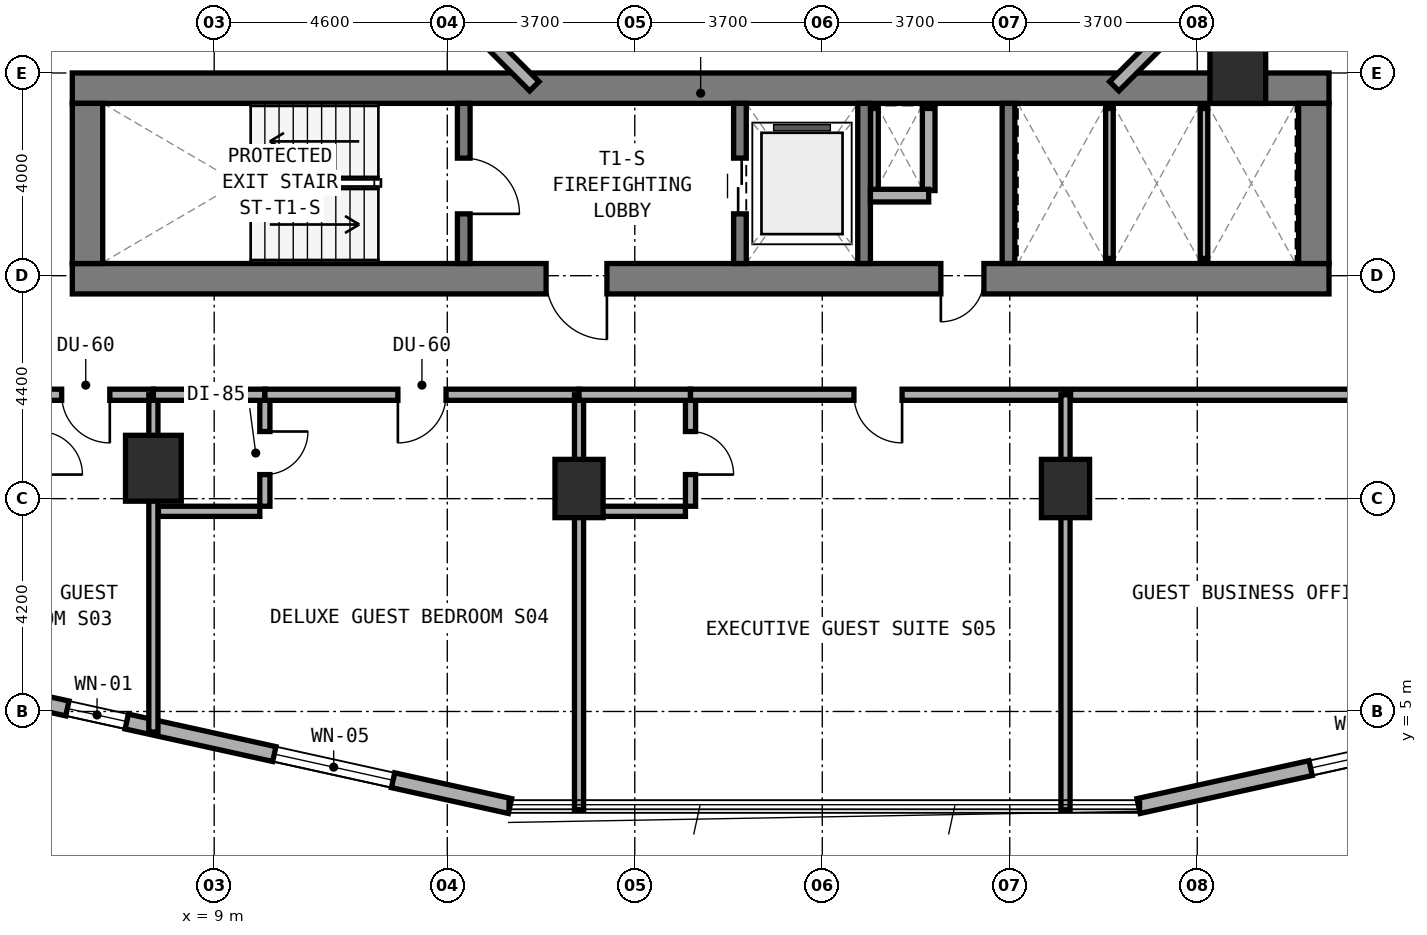
"""IFC4 building model, lengths in metres.
Left out: names, types, materials, properties, quantities, classifications, styles, units other than length and angle.
Written with IfcOpenShell. Run it as: python <this file> out.ifc"""

import sys

from ifc_helpers import new_model, si_unit, direction, frame, frame_2d, origin, origin_2d, place, context, subcontext, project, spatial, rectangle, extrude, element, fill, save


model = new_model("IFC4")
c1 = context("Model", 3, precision=1e-05, world=origin(), true_north=direction((0.0, 1.0)))
c2 = subcontext(c1, "Body", "Model", "MODEL_VIEW")
j1 = project(units=[si_unit("LENGTHUNIT", "METRE"), si_unit("PLANEANGLEUNIT", "RADIAN")], contexts=[c1])
p1 = place(None, origin())
s1 = spatial("IfcSite", under=j1, at=p1, CompositionType="ELEMENT")
p2 = place(p1, origin())
s2 = spatial("IfcBuilding", under=s1, at=p2, CompositionType="ELEMENT")
p3 = place(p2, frame((0.0, 0.0, 24.0)))
s3 = spatial("IfcBuildingStorey", under=s2, at=p3, CompositionType="ELEMENT", Elevation=24.0)
p4 = place(p3, frame((6.2, 13.54, 0.0), z_axis=(0.0, 0.0, 1.0), x_axis=(1.0, 0.0, 0.0)))
e1 = element("IfcWall", 1, at=p4, inside=s3, PredefinedType="SHEAR", context=c2, shape_type="SweptSolid", body=[
    extrude(rectangle(XDim=24.8, YDim=0.6, at=frame_2d((12.4, 0.0))), origin(), (0.0, 0.0, 1.0), 3.5),
])
p5 = place(p4, frame((9.35, 0.0, 0.0)))
e2 = element("IfcOpeningElement", 2, at=p5, cuts=e1, PredefinedType="OPENING", context=c2, shape_type="SweptSolid", body=[
    extrude(rectangle(XDim=1.2, YDim=2.15, at=frame_2d((0.6, 1.075))), frame((0.0, 0.31, 0.0), z_axis=(0.0, -1.0, 0.0), x_axis=(1.0, 0.0, 0.0)), (0.0, 0.0, 1.0), 0.62),
])
p6 = place(p4, frame((17.14, 0.0, 0.0)))
e3 = element("IfcOpeningElement", 3, at=p6, cuts=e1, PredefinedType="OPENING", context=c2, shape_type="SweptSolid", body=[
    extrude(rectangle(XDim=0.85, YDim=2.1, at=frame_2d((0.425, 1.05))), frame((0.0, 0.31, 0.0), z_axis=(0.0, -1.0, 0.0), x_axis=(1.0, 0.0, 0.0)), (0.0, 0.0, 1.0), 0.62),
])
p7 = place(p3, frame((6.2, 17.3, 0.0), z_axis=(0.0, 0.0, 1.0), x_axis=(1.0, 0.0, 0.0)))
e4 = element("IfcWall", 4, at=p7, inside=s3, PredefinedType="SHEAR", context=c2, shape_type="SweptSolid", body=[
    extrude(rectangle(XDim=24.8, YDim=0.6, at=frame_2d((12.4, 0.0))), origin(), (0.0, 0.0, 1.0), 3.5),
])
for number, where, z_axis, x_axis in (
    (5, (6.5, 13.84, 0.0), (0.0, 0.0, 1.0), (0.0, 1.0, 0.0)),
    (6, (30.7, 13.84, 0.0), (0.0, 0.0, 1.0), (0.0, 1.0, 0.0)),
):
    element("IfcWall", number, at=place(p3, frame(where, z_axis=z_axis, x_axis=x_axis)), inside=s3, PredefinedType="SHEAR", context=c2, shape_type="SweptSolid", body=[
        extrude(rectangle(XDim=3.16, YDim=0.6, at=frame_2d((1.58, 0.0))), origin(), (0.0, 0.0, 1.0), 3.5),
    ])
p8 = place(p3, frame((13.925, 13.84, 0.0), z_axis=(0.0, 0.0, 1.0), x_axis=(0.0, 1.0, 0.0)))
e7 = element("IfcWall", 7, at=p8, inside=s3, PredefinedType="STANDARD", context=c2, shape_type="SweptSolid", body=[
    extrude(rectangle(XDim=3.16, YDim=0.25, at=frame_2d((1.58, 0.0))), origin(), (0.0, 0.0, 1.0), 3.22),
])
p9 = place(p8, frame((0.98, 0.0, 0.0)))
e8 = element("IfcOpeningElement", 8, at=p9, cuts=e7, PredefinedType="OPENING", context=c2, shape_type="SweptSolid", body=[
    extrude(rectangle(XDim=1.1, YDim=2.15, at=frame_2d((0.55, 1.075))), frame((0.0, 0.135, 0.0), z_axis=(0.0, -1.0, 0.0), x_axis=(1.0, 0.0, 0.0)), (0.0, 0.0, 1.0), 0.27),
])
p10 = place(p3, frame((19.375, 13.84, 0.0), z_axis=(0.0, 0.0, 1.0), x_axis=(0.0, 1.0, 0.0)))
e9 = element("IfcWall", 9, at=p10, inside=s3, PredefinedType="STANDARD", context=c2, shape_type="SweptSolid", body=[
    extrude(rectangle(XDim=3.16, YDim=0.25, at=frame_2d((1.58, 0.0))), origin(), (0.0, 0.0, 1.0), 3.22),
])
p11 = place(p10, frame((0.98, 0.0, 0.0)))
e10 = element("IfcOpeningElement", 10, at=p11, cuts=e9, PredefinedType="OPENING", context=c2, shape_type="SweptSolid", body=[
    extrude(rectangle(XDim=1.1, YDim=2.15, at=frame_2d((0.55, 1.075))), frame((0.0, 0.135, 0.0), z_axis=(0.0, -1.0, 0.0), x_axis=(1.0, 0.0, 0.0)), (0.0, 0.0, 1.0), 0.27),
])
for number, where, z_axis, x_axis in (
    (11, (21.825, 13.84, 0.0), (0.0, 0.0, 1.0), (0.0, 1.0, 0.0)),
    (12, (24.675, 13.84, 0.0), (0.0, 0.0, 1.0), (0.0, 1.0, 0.0)),
):
    element("IfcWall", number, at=place(p3, frame(where, z_axis=z_axis, x_axis=x_axis)), inside=s3, PredefinedType="STANDARD", context=c2, shape_type="SweptSolid", body=[
        extrude(rectangle(XDim=3.16, YDim=0.25, at=frame_2d((1.58, 0.0))), origin(), (0.0, 0.0, 1.0), 3.22),
    ])
for number, where, z_axis, x_axis in (
    (13, (16.2, 9.4, 0.0), (0.0, 0.0, 1.0), (1.0, 0.0, 0.0)),
    (14, (25.8, 9.4, 0.0), (0.0, 0.0, 1.0), (1.0, 0.0, 0.0)),
):
    element("IfcColumn", number, at=place(p3, frame(where, z_axis=z_axis, x_axis=x_axis)), inside=s3, PredefinedType="COLUMN", context=c2, shape_type="SweptSolid", body=[
        extrude(rectangle(XDim=0.95, YDim=1.15, at=origin_2d()), origin(), (0.0, 0.0, 1.0), 3.5),
    ])
for number, where, z_axis, x_axis in (
    (15, (7.8, 9.8, 0.0), (0.0, 0.0, 1.0), (1.0, 0.0, 0.0)),
    (16, (29.2, 17.65, 0.0), (0.0, 0.0, 1.0), (1.0, 0.0, 0.0)),
):
    element("IfcColumn", number, at=place(p3, frame(where, z_axis=z_axis, x_axis=x_axis)), inside=s3, PredefinedType="COLUMN", context=c2, shape_type="SweptSolid", body=[
        extrude(rectangle(XDim=1.1, YDim=1.3, at=origin_2d()), origin(), (0.0, 0.0, 1.0), 3.5),
    ])
p12 = place(p3, frame((5.704, 5.148, 0.0), z_axis=(0.0, 0.0, 1.0), x_axis=(0.9765437942, -0.215318875183, 0.0)))
e17 = element("IfcWall", 17, at=p12, inside=s3, PredefinedType="STANDARD", context=c2, shape_type="SweptSolid", body=[
    extrude(rectangle(XDim=9.353, YDim=0.3, at=frame_2d((4.677, 0.0))), origin(), (0.0, 0.0, 1.0), 3.22),
])
p13 = place(p12, frame((0.408, 0.0, 0.85)))
e18 = element("IfcOpeningElement", 18, at=p13, cuts=e17, PredefinedType="OPENING", context=c2, shape_type="SweptSolid", body=[
    extrude(rectangle(XDim=1.2, YDim=1.5, at=frame_2d((0.6, 0.75))), frame((0.0, 0.16, 0.0), z_axis=(0.0, -1.0, 0.0), x_axis=(1.0, 0.0, 0.0)), (0.0, 0.0, 1.0), 0.32),
])
p14 = place(p12, frame((4.59, 0.0, 0.8)))
e19 = element("IfcOpeningElement", 19, at=p14, cuts=e17, PredefinedType="OPENING", context=c2, shape_type="SweptSolid", body=[
    extrude(rectangle(XDim=2.4, YDim=1.6, at=frame_2d((1.2, 0.8))), frame((0.0, 0.16, 0.0), z_axis=(0.0, -1.0, 0.0), x_axis=(1.0, 0.0, 0.0)), (0.0, 0.0, 1.0), 0.32),
])
p15 = place(p3, frame((27.242, 3.134, 0.0), z_axis=(0.0, 0.0, 1.0), x_axis=(0.97654500432, 0.215313386808, 0.0)))
e20 = element("IfcWall", 20, at=p15, inside=s3, PredefinedType="STANDARD", context=c2, shape_type="SweptSolid", body=[
    extrude(rectangle(XDim=9.354, YDim=0.3, at=frame_2d((4.677, 0.0))), origin(), (0.0, 0.0, 1.0), 3.22),
])
p16 = place(p15, frame((3.477, 0.0, 0.8)))
e21 = element("IfcOpeningElement", 21, at=p16, cuts=e20, PredefinedType="OPENING", context=c2, shape_type="SweptSolid", body=[
    extrude(rectangle(XDim=2.4, YDim=1.6, at=frame_2d((1.2, 0.8))), frame((0.0, 0.16, 0.0), z_axis=(0.0, -1.0, 0.0), x_axis=(1.0, 0.0, 0.0)), (0.0, 0.0, 1.0), 0.32),
])
p17 = place(p3, frame((26.762, 17.338, 0.0), z_axis=(0.0, 0.0, 1.0), x_axis=(0.707059717605, 0.707153841636, 0.0)))
e22 = element("IfcWall", 22, at=p17, inside=s3, PredefinedType="STANDARD", context=c2, shape_type="SweptSolid", body=[
    extrude(rectangle(XDim=2.594, YDim=0.26, at=frame_2d((1.297, 0.0))), origin(), (0.0, 0.0, 1.0), 3.22),
])
p18 = place(p3, frame((13.484, 19.172, 0.0), z_axis=(0.0, 0.0, 1.0), x_axis=(0.707106781187, -0.707106781187, 0.0)))
e23 = element("IfcWall", 23, at=p18, inside=s3, PredefinedType="STANDARD", context=c2, shape_type="SweptSolid", body=[
    extrude(rectangle(XDim=2.594, YDim=0.26, at=frame_2d((1.297, 0.0))), origin(), (0.0, 0.0, 1.0), 3.22),
])
p19 = place(p3, frame((22.03, 15.28, 0.0), z_axis=(0.0, 0.0, 1.0), x_axis=(0.0, 1.0, 0.0)))
e24 = element("IfcWall", 24, at=p19, inside=s3, PredefinedType="PARTITIONING", context=c2, shape_type="SweptSolid", body=[
    extrude(rectangle(XDim=1.62, YDim=0.15, at=frame_2d((0.81, 0.0))), origin(), (0.0, 0.0, 1.0), 3.22),
])
p20 = place(p3, frame((23.1, 15.28, 0.0), z_axis=(0.0, 0.0, 1.0), x_axis=(0.0, 1.0, 0.0)))
e25 = element("IfcWall", 25, at=p20, inside=s3, PredefinedType="SOLIDWALL", context=c2, shape_type="SweptSolid", body=[
    extrude(rectangle(XDim=1.62, YDim=0.25, at=frame_2d((0.81, 0.0))), origin(), (0.0, 0.0, 1.0), 3.22),
])
p21 = place(p3, frame((21.95, 15.18, 0.0), z_axis=(0.0, 0.0, 1.0), x_axis=(1.0, 0.0, 0.0)))
e26 = element("IfcWall", 26, at=p21, inside=s3, PredefinedType="SOLIDWALL", context=c2, shape_type="SweptSolid", body=[
    extrude(rectangle(XDim=1.15, YDim=0.25, at=frame_2d((0.575, 0.0))), origin(), (0.0, 0.0, 1.0), 3.22),
])
p22 = place(p3, frame((26.667, 13.94, 0.0), z_axis=(0.0, 0.0, 1.0), x_axis=(0.0, 1.0, 0.0)))
e27 = element("IfcWall", 27, at=p22, inside=s3, PredefinedType="PARTITIONING", context=c2, shape_type="SweptSolid", body=[
    extrude(rectangle(XDim=2.96, YDim=0.15, at=frame_2d((1.48, 0.0))), origin(), (0.0, 0.0, 1.0), 3.22),
])
p23 = place(p3, frame((28.533, 13.94, 0.0), z_axis=(0.0, 0.0, 1.0), x_axis=(0.0, 1.0, 0.0)))
e28 = element("IfcWall", 28, at=p23, inside=s3, PredefinedType="PARTITIONING", context=c2, shape_type="SweptSolid", body=[
    extrude(rectangle(XDim=2.96, YDim=0.15, at=frame_2d((1.48, 0.0))), origin(), (0.0, 0.0, 1.0), 2.295),
])
p24 = place(p3, frame((5.55, 11.25, 0.0), z_axis=(0.0, 0.0, 1.0), x_axis=(1.0, 0.0, 0.0)))
e29 = element("IfcWall", 29, at=p24, inside=s3, PredefinedType="SOLIDWALL", context=c2, shape_type="SweptSolid", body=[
    extrude(rectangle(XDim=2.25, YDim=0.22, at=frame_2d((1.125, 0.0))), origin(), (0.0, 0.0, 1.0), 2.295),
])
p25 = place(p24, frame((0.44, 0.0, 0.0)))
e30 = element("IfcOpeningElement", 30, at=p25, cuts=e29, PredefinedType="OPENING", context=c2, shape_type="SweptSolid", body=[
    extrude(rectangle(XDim=0.95, YDim=2.1, at=frame_2d((0.475, 1.05))), frame((0.0, 0.12, 0.0), z_axis=(0.0, -1.0, 0.0), x_axis=(1.0, 0.0, 0.0)), (0.0, 0.0, 1.0), 0.24),
])
p26 = place(p3, frame((7.8, 4.594, 0.0), z_axis=(0.0, 0.0, 1.0), x_axis=(0.0, 1.0, 0.0)))
e31 = element("IfcWall", 31, at=p26, inside=s3, PredefinedType="SOLIDWALL", context=c2, shape_type="SweptSolid", body=[
    extrude(rectangle(XDim=6.656, YDim=0.18, at=frame_2d((3.328, 0.0))), origin(), (0.0, 0.0, 1.0), 2.295),
])
p27 = place(p3, frame((10.0, 9.05, 0.0), z_axis=(0.0, 0.0, 1.0), x_axis=(0.0, 1.0, 0.0)))
e32 = element("IfcWall", 32, at=p27, inside=s3, PredefinedType="PLUMBINGWALL", context=c2, shape_type="SweptSolid", body=[
    extrude(rectangle(XDim=2.1, YDim=0.2, at=frame_2d((1.05, 0.0))), origin(), (0.0, 0.0, 1.0), 2.745),
])
p28 = place(p27, frame((0.625, 0.0, 0.0)))
e33 = element("IfcOpeningElement", 33, at=p28, cuts=e32, PredefinedType="OPENING", context=c2, shape_type="SweptSolid", body=[
    extrude(rectangle(XDim=0.85, YDim=2.1, at=frame_2d((0.425, 1.05))), frame((0.0, 0.11, 0.0), z_axis=(0.0, -1.0, 0.0), x_axis=(1.0, 0.0, 0.0)), (0.0, 0.0, 1.0), 0.22),
])
p29 = place(p3, frame((7.9, 8.95, 0.0), z_axis=(0.0, 0.0, 1.0), x_axis=(1.0, 0.0, 0.0)))
e34 = element("IfcWall", 34, at=p29, inside=s3, PredefinedType="PLUMBINGWALL", context=c2, shape_type="SweptSolid", body=[
    extrude(rectangle(XDim=2.0, YDim=0.2, at=frame_2d((1.0, 0.0))), origin(), (0.0, 0.0, 1.0), 3.22),
])
p30 = place(p3, frame((7.8, 11.25, 0.0), z_axis=(0.0, 0.0, 1.0), x_axis=(1.0, 0.0, 0.0)))
e35 = element("IfcWall", 35, at=p30, inside=s3, PredefinedType="SOLIDWALL", context=c2, shape_type="SweptSolid", body=[
    extrude(rectangle(XDim=2.2, YDim=0.22, at=frame_2d((1.1, 0.0))), origin(), (0.0, 0.0, 1.0), 2.295),
])
p31 = place(p3, frame((10.0, 11.25, 0.0), z_axis=(0.0, 0.0, 1.0), x_axis=(1.0, 0.0, 0.0)))
e36 = element("IfcWall", 36, at=p31, inside=s3, PredefinedType="SOLIDWALL", context=c2, shape_type="SweptSolid", body=[
    extrude(rectangle(XDim=6.2, YDim=0.22, at=frame_2d((3.1, 0.0))), origin(), (0.0, 0.0, 1.0), 2.295),
])
p32 = place(p31, frame((2.625, 0.0, 0.0)))
e37 = element("IfcOpeningElement", 37, at=p32, cuts=e36, PredefinedType="OPENING", context=c2, shape_type="SweptSolid", body=[
    extrude(rectangle(XDim=0.95, YDim=2.1, at=frame_2d((0.475, 1.05))), frame((0.0, 0.12, 0.0), z_axis=(0.0, -1.0, 0.0), x_axis=(1.0, 0.0, 0.0)), (0.0, 0.0, 1.0), 0.24),
])
p33 = place(p3, frame((16.2, 3.06, 0.0), z_axis=(0.0, 0.0, 1.0), x_axis=(0.0, 1.0, 0.0)))
e38 = element("IfcWall", 38, at=p33, inside=s3, PredefinedType="SOLIDWALL", context=c2, shape_type="SweptSolid", body=[
    extrude(rectangle(XDim=8.19, YDim=0.18, at=frame_2d((4.095, 0.0))), origin(), (0.0, 0.0, 1.0), 2.295),
])
p34 = place(p3, frame((18.4, 9.05, 0.0), z_axis=(0.0, 0.0, 1.0), x_axis=(0.0, 1.0, 0.0)))
e39 = element("IfcWall", 39, at=p34, inside=s3, PredefinedType="PLUMBINGWALL", context=c2, shape_type="SweptSolid", body=[
    extrude(rectangle(XDim=2.1, YDim=0.2, at=frame_2d((1.05, 0.0))), origin(), (0.0, 0.0, 1.0), 2.745),
])
p35 = place(p34, frame((0.625, 0.0, 0.0)))
e40 = element("IfcOpeningElement", 40, at=p35, cuts=e39, PredefinedType="OPENING", context=c2, shape_type="SweptSolid", body=[
    extrude(rectangle(XDim=0.85, YDim=2.1, at=frame_2d((0.425, 1.05))), frame((0.0, 0.11, 0.0), z_axis=(0.0, -1.0, 0.0), x_axis=(1.0, 0.0, 0.0)), (0.0, 0.0, 1.0), 0.22),
])
p36 = place(p3, frame((16.3, 8.95, 0.0), z_axis=(0.0, 0.0, 1.0), x_axis=(1.0, 0.0, 0.0)))
e41 = element("IfcWall", 41, at=p36, inside=s3, PredefinedType="PLUMBINGWALL", context=c2, shape_type="SweptSolid", body=[
    extrude(rectangle(XDim=2.0, YDim=0.2, at=frame_2d((1.0, 0.0))), origin(), (0.0, 0.0, 1.0), 3.22),
])
p37 = place(p3, frame((16.2, 11.25, 0.0), z_axis=(0.0, 0.0, 1.0), x_axis=(1.0, 0.0, 0.0)))
e42 = element("IfcWall", 42, at=p37, inside=s3, PredefinedType="SOLIDWALL", context=c2, shape_type="SweptSolid", body=[
    extrude(rectangle(XDim=2.2, YDim=0.22, at=frame_2d((1.1, 0.0))), origin(), (0.0, 0.0, 1.0), 2.295),
])
p38 = place(p3, frame((18.4, 11.25, 0.0), z_axis=(0.0, 0.0, 1.0), x_axis=(1.0, 0.0, 0.0)))
e43 = element("IfcWall", 43, at=p38, inside=s3, PredefinedType="SOLIDWALL", context=c2, shape_type="SweptSolid", body=[
    extrude(rectangle(XDim=7.4, YDim=0.22, at=frame_2d((3.7, 0.0))), origin(), (0.0, 0.0, 1.0), 2.295),
])
p39 = place(p38, frame((3.225, 0.0, 0.0)))
e44 = element("IfcOpeningElement", 44, at=p39, cuts=e43, PredefinedType="OPENING", context=c2, shape_type="SweptSolid", body=[
    extrude(rectangle(XDim=0.95, YDim=2.1, at=frame_2d((0.475, 1.05))), frame((0.0, 0.12, 0.0), z_axis=(0.0, -1.0, 0.0), x_axis=(1.0, 0.0, 0.0)), (0.0, 0.0, 1.0), 0.24),
])
p40 = place(p3, frame((25.8, 3.06, 0.0), z_axis=(0.0, 0.0, 1.0), x_axis=(0.0, 1.0, 0.0)))
e45 = element("IfcWall", 45, at=p40, inside=s3, PredefinedType="SOLIDWALL", context=c2, shape_type="SweptSolid", body=[
    extrude(rectangle(XDim=8.19, YDim=0.18, at=frame_2d((4.095, 0.0))), origin(), (0.0, 0.0, 1.0), 2.295),
])
p41 = place(p3, frame((25.9, 11.25, 0.0), z_axis=(0.0, 0.0, 1.0), x_axis=(1.0, 0.0, 0.0)))
e46 = element("IfcWall", 46, at=p41, inside=s3, PredefinedType="SOLIDWALL", context=c2, shape_type="SweptSolid", body=[
    extrude(rectangle(XDim=15.84, YDim=0.22, at=frame_2d((7.92, 0.0))), origin(), (0.0, 0.0, 1.0), 2.295),
])
p42 = place(p41, frame((6.411, 0.0, 0.0)))
e47 = element("IfcOpeningElement", 47, at=p42, cuts=e46, PredefinedType="OPENING", context=c2, shape_type="SweptSolid", body=[
    extrude(rectangle(XDim=0.95, YDim=2.1, at=frame_2d((0.475, 1.05))), frame((0.0, 0.12, 0.0), z_axis=(0.0, -1.0, 0.0), x_axis=(1.0, 0.0, 0.0)), (0.0, 0.0, 1.0), 0.24),
])
p43 = place(p13, origin())
e48 = element("IfcWindow", 48, at=p43, inside=s3, PartitioningType="SINGLE_PANEL", PredefinedType="WINDOW", context=c2, shape_type="SweptSolid", body=[
    extrude(rectangle(XDim=1.2, YDim=1.5, at=frame_2d((0.6, 0.75))), frame((0.0, 0.03, 0.0), z_axis=(0.0, -1.0, 0.0), x_axis=(1.0, 0.0, 0.0)), (0.0, 0.0, 1.0), 0.06),
])
fill(e18, e48)
p44 = place(p14, origin())
e49 = element("IfcWindow", 49, at=p44, inside=s3, PartitioningType="SINGLE_PANEL", PredefinedType="WINDOW", context=c2, shape_type="SweptSolid", body=[
    extrude(rectangle(XDim=2.4, YDim=1.6, at=frame_2d((1.2, 0.8))), frame((0.0, 0.03, 0.0), z_axis=(0.0, -1.0, 0.0), x_axis=(1.0, 0.0, 0.0)), (0.0, 0.0, 1.0), 0.06),
])
fill(e19, e49)
p45 = place(p16, origin())
e50 = element("IfcWindow", 50, at=p45, inside=s3, PartitioningType="SINGLE_PANEL", PredefinedType="WINDOW", context=c2, shape_type="SweptSolid", body=[
    extrude(rectangle(XDim=2.4, YDim=1.6, at=frame_2d((1.2, 0.8))), frame((0.0, 0.03, 0.0), z_axis=(0.0, -1.0, 0.0), x_axis=(1.0, 0.0, 0.0)), (0.0, 0.0, 1.0), 0.06),
])
fill(e21, e50)
p46 = place(p9, frame((1.1, 0.0, 0.0), z_axis=(0.0, 0.0, 1.0), x_axis=(-1.0, 0.0, 0.0)))
e51 = element("IfcDoor", 51, at=p46, inside=s3, OperationType="SINGLE_SWING_RIGHT", PredefinedType="DOOR", context=c2, shape_type="SweptSolid", body=[
    extrude(rectangle(XDim=1.1, YDim=2.15, at=frame_2d((0.55, 1.075))), frame((0.0, 0.025, 0.0), z_axis=(0.0, -1.0, 0.0), x_axis=(1.0, 0.0, 0.0)), (0.0, 0.0, 1.0), 0.05),
])
fill(e8, e51)
p47 = place(p5, frame((1.2, 0.0, 0.0), z_axis=(0.0, 0.0, 1.0), x_axis=(-1.0, 0.0, 0.0)))
e52 = element("IfcDoor", 52, at=p47, inside=s3, OperationType="SINGLE_SWING_LEFT", PredefinedType="DOOR", context=c2, shape_type="SweptSolid", body=[
    extrude(rectangle(XDim=1.2, YDim=2.15, at=frame_2d((0.6, 1.075))), frame((0.0, 0.025, 0.0), z_axis=(0.0, -1.0, 0.0), x_axis=(1.0, 0.0, 0.0)), (0.0, 0.0, 1.0), 0.05),
])
fill(e2, e52)
p48 = place(p11, origin())
e53 = element("IfcDoor", 53, at=p48, inside=s3, OperationType="DOUBLE_DOOR_SLIDING", PredefinedType="DOOR", context=c2, shape_type="SweptSolid", body=[
    extrude(rectangle(XDim=1.1, YDim=2.15, at=frame_2d((0.55, 1.075))), frame((0.0, 0.025, 0.0), z_axis=(0.0, -1.0, 0.0), x_axis=(1.0, 0.0, 0.0)), (0.0, 0.0, 1.0), 0.05),
])
fill(e10, e53)
p49 = place(p6, frame((0.85, 0.0, 0.0), z_axis=(0.0, 0.0, 1.0), x_axis=(-1.0, 0.0, 0.0)))
e54 = element("IfcDoor", 54, at=p49, inside=s3, OperationType="SINGLE_SWING_RIGHT", PredefinedType="DOOR", context=c2, shape_type="SweptSolid", body=[
    extrude(rectangle(XDim=0.85, YDim=2.1, at=frame_2d((0.425, 1.05))), frame((0.0, 0.025, 0.0), z_axis=(0.0, -1.0, 0.0), x_axis=(1.0, 0.0, 0.0)), (0.0, 0.0, 1.0), 0.05),
])
fill(e3, e54)
p50 = place(p25, frame((0.95, 0.0, 0.0), z_axis=(0.0, 0.0, 1.0), x_axis=(-1.0, 0.0, 0.0)))
e55 = element("IfcDoor", 55, at=p50, inside=s3, OperationType="SINGLE_SWING_LEFT", PredefinedType="DOOR", context=c2, shape_type="SweptSolid", body=[
    extrude(rectangle(XDim=0.95, YDim=2.1, at=frame_2d((0.475, 1.05))), frame((0.0, 0.025, 0.0), z_axis=(0.0, -1.0, 0.0), x_axis=(1.0, 0.0, 0.0)), (0.0, 0.0, 1.0), 0.05),
])
fill(e30, e55)
p51 = place(p28, frame((0.85, 0.0, 0.0), z_axis=(0.0, 0.0, 1.0), x_axis=(-1.0, 0.0, 0.0)))
e56 = element("IfcDoor", 56, at=p51, inside=s3, OperationType="SINGLE_SWING_LEFT", PredefinedType="DOOR", context=c2, shape_type="SweptSolid", body=[
    extrude(rectangle(XDim=0.85, YDim=2.1, at=frame_2d((0.425, 1.05))), frame((0.0, 0.025, 0.0), z_axis=(0.0, -1.0, 0.0), x_axis=(1.0, 0.0, 0.0)), (0.0, 0.0, 1.0), 0.05),
])
fill(e33, e56)
p52 = place(p32, frame((0.95, 0.0, 0.0), z_axis=(0.0, 0.0, 1.0), x_axis=(-1.0, 0.0, 0.0)))
e57 = element("IfcDoor", 57, at=p52, inside=s3, OperationType="SINGLE_SWING_RIGHT", PredefinedType="DOOR", context=c2, shape_type="SweptSolid", body=[
    extrude(rectangle(XDim=0.95, YDim=2.1, at=frame_2d((0.475, 1.05))), frame((0.0, 0.025, 0.0), z_axis=(0.0, -1.0, 0.0), x_axis=(1.0, 0.0, 0.0)), (0.0, 0.0, 1.0), 0.05),
])
fill(e37, e57)
p53 = place(p35, frame((0.85, 0.0, 0.0), z_axis=(0.0, 0.0, 1.0), x_axis=(-1.0, 0.0, 0.0)))
e58 = element("IfcDoor", 58, at=p53, inside=s3, OperationType="SINGLE_SWING_RIGHT", PredefinedType="DOOR", context=c2, shape_type="SweptSolid", body=[
    extrude(rectangle(XDim=0.85, YDim=2.1, at=frame_2d((0.425, 1.05))), frame((0.0, 0.025, 0.0), z_axis=(0.0, -1.0, 0.0), x_axis=(1.0, 0.0, 0.0)), (0.0, 0.0, 1.0), 0.05),
])
fill(e40, e58)
p54 = place(p39, frame((0.95, 0.0, 0.0), z_axis=(0.0, 0.0, 1.0), x_axis=(-1.0, 0.0, 0.0)))
e59 = element("IfcDoor", 59, at=p54, inside=s3, OperationType="SINGLE_SWING_LEFT", PredefinedType="DOOR", context=c2, shape_type="SweptSolid", body=[
    extrude(rectangle(XDim=0.95, YDim=2.1, at=frame_2d((0.475, 1.05))), frame((0.0, 0.025, 0.0), z_axis=(0.0, -1.0, 0.0), x_axis=(1.0, 0.0, 0.0)), (0.0, 0.0, 1.0), 0.05),
])
fill(e44, e59)
save(model, sys.argv[1])
